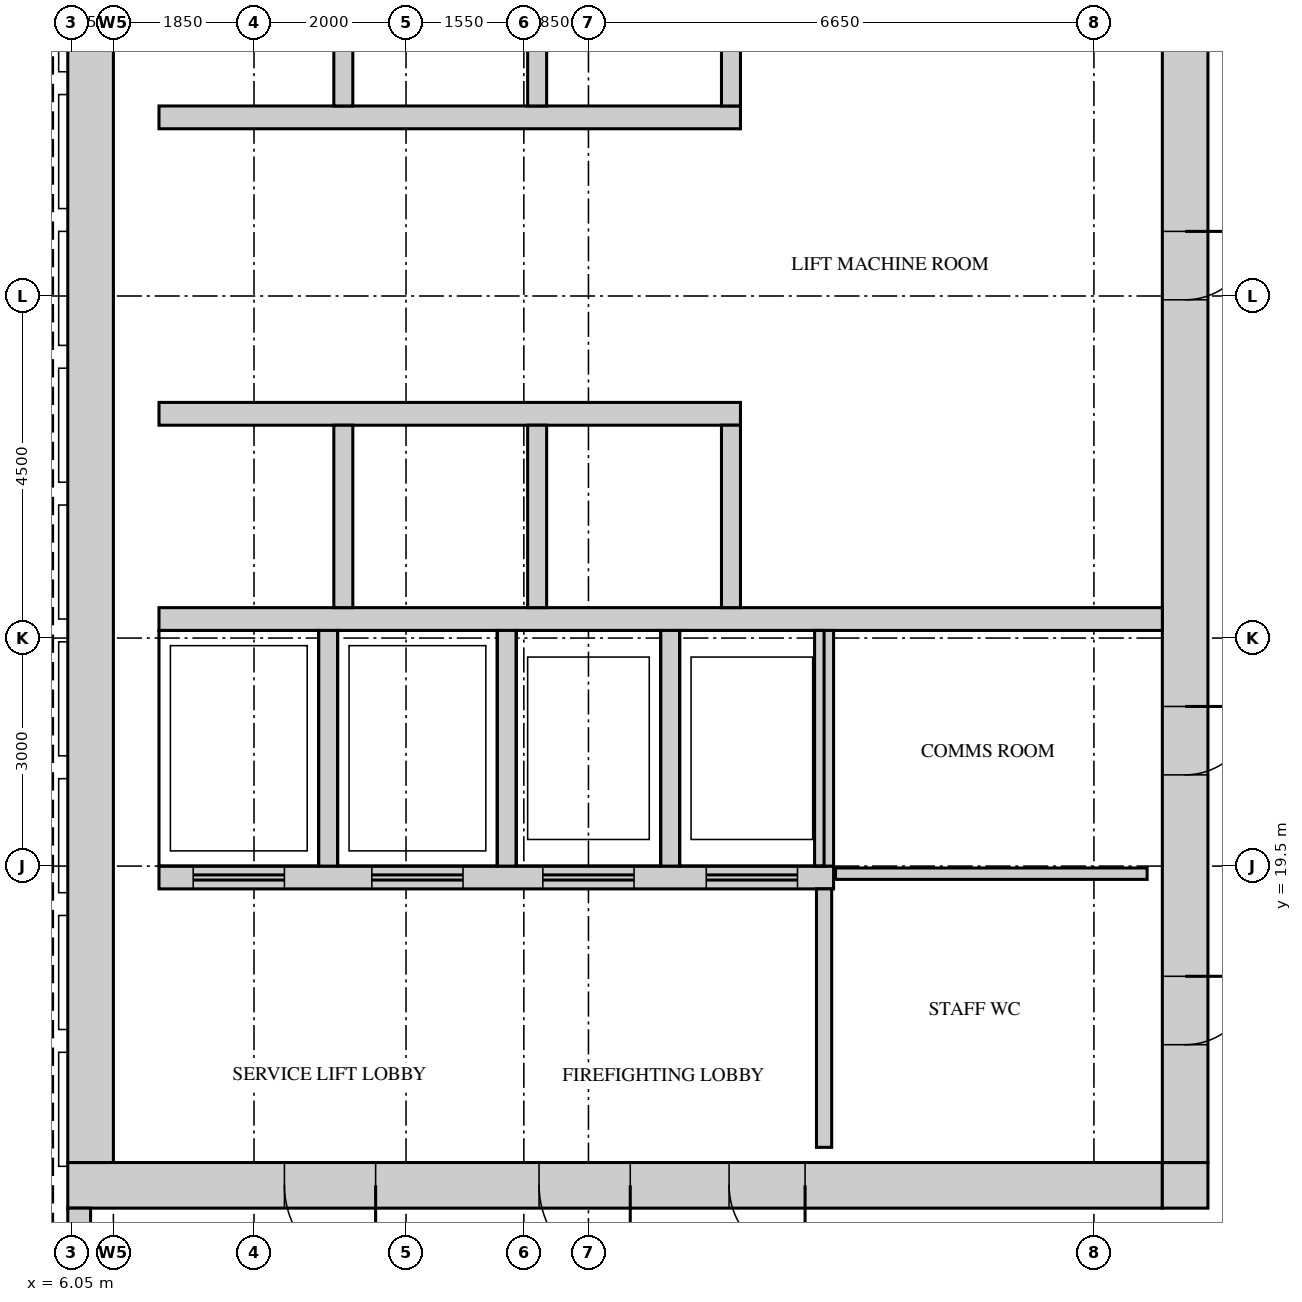
"""IFC4 building model, lengths in metres.
Left out: names, types, materials, properties, quantities, classifications, styles, units other than length and angle.
Written with IfcOpenShell. Run it as: python <this file> out.ifc"""

import sys

from ifc_helpers import new_model, si_unit, direction, frame, frame_2d, origin, place, context, subcontext, project, spatial, rectangle, extrude, source, transform, mapped, element, fill, save


model = new_model("IFC4")
c1 = context("Model", 3, precision=1e-05, world=origin(), true_north=direction((0.0, 1.0)))
c2 = subcontext(c1, "Body", "Model", "MODEL_VIEW")
j1 = project(units=[si_unit("LENGTHUNIT", "METRE"), si_unit("PLANEANGLEUNIT", "RADIAN")], contexts=[c1])
p1 = place(None, origin())
s1 = spatial("IfcSite", under=j1, at=p1, CompositionType="ELEMENT")
p2 = place(p1, origin())
s2 = spatial("IfcBuilding", under=s1, at=p2, CompositionType="ELEMENT")
p3 = place(p2, frame((0.0, 0.0, 330.2)))
s3 = spatial("IfcBuildingStorey", under=s2, at=p3, CompositionType="ELEMENT", Elevation=330.2)
m1 = source(origin(), c2, "Body", "SweptSolid", [
    extrude(rectangle(XDim=14.4, YDim=0.6, at=frame_2d((7.2, 0.0))), origin(), (0.0, 0.0, 1.0), 4.25),
])
p4 = place(p3, frame((6.0, 15.3, 0.0), z_axis=(0.0, 0.0, 1.0), x_axis=(1.0, 0.0, 0.0)))
e1 = element("IfcWall", 1, at=p4, inside=s3, PredefinedType="SHEAR", context=c2, shape_type="MappedRepresentation", body=[
    mapped(m1, transform((0.0, 0.0, 0.0))),
])
m2 = source(origin(), c2, "Body", "SweptSolid", [
    extrude(rectangle(XDim=1.2, YDim=2.1, at=frame_2d((0.6, 1.05))), frame((0.0, 0.31, 0.0), z_axis=(0.0, -1.0, 0.0), x_axis=(1.0, 0.0, 0.0)), (0.0, 0.0, 1.0), 0.62),
])
p5 = place(p4, frame((6.2, 0.0, 0.0)))
e2 = element("IfcOpeningElement", 2, at=p5, cuts=e1, PredefinedType="OPENING", context=c2, shape_type="MappedRepresentation", body=[
    mapped(m2, transform((0.0, 0.0, 0.0))),
])
p6 = place(p4, frame((2.85, 0.0, 0.0)))
e3 = element("IfcOpeningElement", 3, at=p6, cuts=e1, PredefinedType="OPENING", context=c2, shape_type="MappedRepresentation", body=[
    mapped(m2, transform((0.0, 0.0, 0.0))),
])
m3 = source(origin(), c2, "Body", "SweptSolid", [
    extrude(rectangle(XDim=1.0, YDim=2.1, at=frame_2d((0.5, 1.05))), frame((0.0, 0.31, 0.0), z_axis=(0.0, -1.0, 0.0), x_axis=(1.0, 0.0, 0.0)), (0.0, 0.0, 1.0), 0.62),
])
p7 = place(p4, frame((8.7, 0.0, 0.0)))
e4 = element("IfcOpeningElement", 4, at=p7, cuts=e1, PredefinedType="OPENING", context=c2, shape_type="MappedRepresentation", body=[
    mapped(m3, transform((0.0, 0.0, 0.0))),
])
m4 = source(origin(), c2, "Body", "SweptSolid", [
    extrude(rectangle(XDim=0.6, YDim=0.6, at=frame_2d((0.3, 0.0))), origin(), (0.0, 0.0, 1.0), 4.25),
])
p8 = place(p3, frame((20.4, 15.3, 0.0), z_axis=(0.0, 0.0, 1.0), x_axis=(1.0, 0.0, 0.0)))
e5 = element("IfcWall", 5, at=p8, inside=s3, PredefinedType="SHEAR", context=c2, shape_type="MappedRepresentation", body=[
    mapped(m4, transform((0.0, 0.0, 0.0))),
])
m5 = source(origin(), c2, "Body", "SweptSolid", [
    extrude(rectangle(XDim=22.8, YDim=0.6, at=frame_2d((11.4, 0.0))), origin(), (0.0, 0.0, 1.0), 4.25),
])
p9 = place(p3, frame((20.7, 15.6, 0.0), z_axis=(0.0, 0.0, 1.0), x_axis=(0.0, 1.0, 0.0)))
e6 = element("IfcWall", 6, at=p9, inside=s3, PredefinedType="SHEAR", context=c2, shape_type="MappedRepresentation", body=[
    mapped(m5, transform((0.0, 0.0, 0.0))),
])
m6 = source(origin(), c2, "Body", "SweptSolid", [
    extrude(rectangle(XDim=0.9, YDim=2.1, at=frame_2d((0.45, 1.05))), frame((0.0, 0.31, 0.0), z_axis=(0.0, -1.0, 0.0), x_axis=(1.0, 0.0, 0.0)), (0.0, 0.0, 1.0), 0.62),
])
p10 = place(p9, frame((11.35, 0.0, 0.0)))
e7 = element("IfcOpeningElement", 7, at=p10, cuts=e6, PredefinedType="OPENING", context=c2, shape_type="MappedRepresentation", body=[
    mapped(m6, transform((0.0, 0.0, 0.0))),
])
p11 = place(p9, frame((1.55, 0.0, 0.0)))
e8 = element("IfcOpeningElement", 8, at=p11, cuts=e6, PredefinedType="OPENING", context=c2, shape_type="MappedRepresentation", body=[
    mapped(m6, transform((0.0, 0.0, 0.0))),
])
p12 = place(p9, frame((5.1, 0.0, 0.0)))
e9 = element("IfcOpeningElement", 9, at=p12, cuts=e6, PredefinedType="OPENING", context=c2, shape_type="MappedRepresentation", body=[
    mapped(m6, transform((0.0, 0.0, 0.0))),
])
p13 = place(p3, frame((6.3, 15.6, 0.0), z_axis=(0.0, 0.0, 1.0), x_axis=(0.0, 1.0, 0.0)))
e10 = element("IfcWall", 10, at=p13, inside=s3, PredefinedType="SHEAR", context=c2, shape_type="MappedRepresentation", body=[
    mapped(m5, transform((0.0, 0.0, 0.0))),
])
m7 = source(origin(), c2, "Body", "SweptSolid", [
    extrude(rectangle(XDim=13.2, YDim=0.3, at=frame_2d((6.6, 0.0))), origin(), (0.0, 0.0, 1.0), 4.25),
])
p14 = place(p3, frame((7.2, 22.75, 0.0), z_axis=(0.0, 0.0, 1.0), x_axis=(1.0, 0.0, 0.0)))
e11 = element("IfcWall", 11, at=p14, inside=s3, PredefinedType="STANDARD", context=c2, shape_type="MappedRepresentation", body=[
    mapped(m7, transform((0.0, 0.0, 0.0))),
])
m8 = source(origin(), c2, "Body", "SweptSolid", [
    extrude(rectangle(XDim=8.875, YDim=0.3, at=frame_2d((4.438, 0.0))), origin(), (0.0, 0.0, 1.0), 4.25),
])
p15 = place(p3, frame((7.2, 19.35, 0.0), z_axis=(0.0, 0.0, 1.0), x_axis=(1.0, 0.0, 0.0)))
e12 = element("IfcWall", 12, at=p15, inside=s3, PredefinedType="STANDARD", context=c2, shape_type="MappedRepresentation", body=[
    mapped(m8, transform((0.0, 0.0, 0.0))),
])
m9 = source(origin(), c2, "Body", "SweptSolid", [
    extrude(rectangle(XDim=1.2, YDim=2.1, at=frame_2d((0.6, 1.05))), frame((0.0, 0.16, 0.0), z_axis=(0.0, -1.0, 0.0), x_axis=(1.0, 0.0, 0.0)), (0.0, 0.0, 1.0), 0.32),
])
p16 = place(p15, frame((0.45, 0.0, 0.0)))
e13 = element("IfcOpeningElement", 13, at=p16, cuts=e12, PredefinedType="OPENING", context=c2, shape_type="MappedRepresentation", body=[
    mapped(m9, transform((0.0, 0.0, 0.0))),
])
p17 = place(p15, frame((2.8, 0.0, 0.0)))
e14 = element("IfcOpeningElement", 14, at=p17, cuts=e12, PredefinedType="OPENING", context=c2, shape_type="MappedRepresentation", body=[
    mapped(m9, transform((0.0, 0.0, 0.0))),
])
p18 = place(p15, frame((5.05, 0.0, 0.0)))
e15 = element("IfcOpeningElement", 15, at=p18, cuts=e12, PredefinedType="OPENING", context=c2, shape_type="MappedRepresentation", body=[
    mapped(m9, transform((0.0, 0.0, 0.0))),
])
p19 = place(p15, frame((7.2, 0.0, 0.0)))
e16 = element("IfcOpeningElement", 16, at=p19, cuts=e12, PredefinedType="OPENING", context=c2, shape_type="MappedRepresentation", body=[
    mapped(m9, transform((0.0, 0.0, 0.0))),
])
m10 = source(origin(), c2, "Body", "SweptSolid", [
    extrude(rectangle(XDim=7.65, YDim=0.3, at=frame_2d((3.825, 0.0))), origin(), (0.0, 0.0, 1.0), 4.25),
])
for number, where, z_axis, x_axis in (
    (17, (7.2, 29.35, 0.0), (0.0, 0.0, 1.0), (1.0, 0.0, 0.0)),
    (18, (7.2, 25.45, 0.0), (0.0, 0.0, 1.0), (1.0, 0.0, 0.0)),
):
    element("IfcWall", number, at=place(p3, frame(where, z_axis=z_axis, x_axis=x_axis)), inside=s3, PredefinedType="STANDARD", context=c2, shape_type="MappedRepresentation", body=[
        mapped(m10, transform((0.0, 0.0, 0.0))),
    ])
m11 = source(origin(), c2, "Body", "SweptSolid", [
    extrude(rectangle(XDim=3.1, YDim=0.25, at=frame_2d((1.55, 0.0))), origin(), (0.0, 0.0, 1.0), 4.25),
])
for number, where, z_axis, x_axis in (
    (19, (9.425, 19.5, 0.0), (0.0, 0.0, 1.0), (0.0, 1.0, 0.0)),
    (20, (11.775, 19.5, 0.0), (0.0, 0.0, 1.0), (0.0, 1.0, 0.0)),
    (21, (13.925, 19.5, 0.0), (0.0, 0.0, 1.0), (0.0, 1.0, 0.0)),
    (22, (15.95, 19.5, 0.0), (0.0, 0.0, 1.0), (0.0, 1.0, 0.0)),
):
    element("IfcWall", number, at=place(p3, frame(where, z_axis=z_axis, x_axis=x_axis)), inside=s3, PredefinedType="STANDARD", context=c2, shape_type="MappedRepresentation", body=[
        mapped(m11, transform((0.0, 0.0, 0.0))),
    ])
m12 = source(origin(), c2, "Body", "SweptSolid", [
    extrude(rectangle(XDim=2.4, YDim=0.25, at=frame_2d((1.2, 0.0))), origin(), (0.0, 0.0, 1.0), 4.25),
])
for number, where, z_axis, x_axis in (
    (23, (9.625, 29.5, 0.0), (0.0, 0.0, 1.0), (0.0, 1.0, 0.0)),
    (24, (12.175, 29.5, 0.0), (0.0, 0.0, 1.0), (0.0, 1.0, 0.0)),
    (25, (14.725, 29.5, 0.0), (0.0, 0.0, 1.0), (0.0, 1.0, 0.0)),
):
    element("IfcWall", number, at=place(p3, frame(where, z_axis=z_axis, x_axis=x_axis)), inside=s3, PredefinedType="STANDARD", context=c2, shape_type="MappedRepresentation", body=[
        mapped(m12, transform((0.0, 0.0, 0.0))),
    ])
m13 = source(origin(), c2, "Body", "SweptSolid", [
    extrude(rectangle(XDim=2.4, YDim=0.25, at=frame_2d((1.2, 0.0))), origin(), (0.0, 0.0, 1.0), 4.25),
])
for number, where, z_axis, x_axis in (
    (26, (9.625, 22.9, 0.0), (0.0, 0.0, 1.0), (0.0, 1.0, 0.0)),
    (27, (12.175, 22.9, 0.0), (0.0, 0.0, 1.0), (0.0, 1.0, 0.0)),
    (28, (14.725, 22.9, 0.0), (0.0, 0.0, 1.0), (0.0, 1.0, 0.0)),
):
    element("IfcWall", number, at=place(p3, frame(where, z_axis=z_axis, x_axis=x_axis)), inside=s3, PredefinedType="STANDARD", context=c2, shape_type="MappedRepresentation", body=[
        mapped(m13, transform((0.0, 0.0, 0.0))),
    ])
m14 = source(origin(), c2, "Body", "SweptSolid", [
    extrude(rectangle(XDim=3.0, YDim=0.3, at=frame_2d((1.5, 0.0))), origin(), (0.0, 0.0, 1.0), 4.5),
])
p20 = place(p3, frame((6.15, 15.0, 0.0), z_axis=(0.0, 0.0, 1.0), x_axis=(0.0, -1.0, 0.0)))
e29 = element("IfcWall", 29, at=p20, inside=s3, PredefinedType="SOLIDWALL", context=c2, shape_type="MappedRepresentation", body=[
    mapped(m14, transform((0.0, 0.0, 0.0))),
])
m15 = source(origin(), c2, "Body", "SweptSolid", [
    extrude(rectangle(XDim=1.2, YDim=2.4, at=frame_2d((0.6, 1.2))), frame((0.0, 0.16, 0.0), z_axis=(0.0, -1.0, 0.0), x_axis=(1.0, 0.0, 0.0)), (0.0, 0.0, 1.0), 0.32),
])
p21 = place(p20, frame((0.9, 0.0, 0.9)))
e30 = element("IfcOpeningElement", 30, at=p21, cuts=e29, PredefinedType="OPENING", context=c2, shape_type="MappedRepresentation", body=[
    mapped(m15, transform((0.0, 0.0, 0.0))),
])
m16 = source(origin(), c2, "Body", "SweptSolid", [
    extrude(rectangle(XDim=3.4, YDim=0.2, at=frame_2d((1.7, 0.0))), origin(), (0.0, 0.0, 1.0), 4.3),
])
p22 = place(p3, frame((15.95, 15.8, 0.0), z_axis=(0.0, 0.0, 1.0), x_axis=(0.0, 1.0, 0.0)))
e31 = element("IfcWall", 31, at=p22, inside=s3, PredefinedType="PARTITIONING", context=c2, shape_type="MappedRepresentation", body=[
    mapped(m16, transform((0.0, 0.0, 0.0))),
])
m17 = source(origin(), c2, "Body", "SweptSolid", [
    extrude(rectangle(XDim=4.1, YDim=0.15, at=frame_2d((2.05, 0.0))), origin(), (0.0, 0.0, 1.0), 4.3),
])
p23 = place(p3, frame((16.1, 19.4, 0.0), z_axis=(0.0, 0.0, 1.0), x_axis=(1.0, 0.0, 0.0)))
e32 = element("IfcWall", 32, at=p23, inside=s3, PredefinedType="PARTITIONING", context=c2, shape_type="MappedRepresentation", body=[
    mapped(m17, transform((0.0, 0.0, 0.0))),
])
m18 = source(origin(), c2, "Body", "SweptSolid", [
    extrude(rectangle(XDim=0.9, YDim=2.1, at=frame_2d((0.45, 1.05))), frame((0.0, 0.25, 0.0), z_axis=(0.0, -1.0, 0.0), x_axis=(1.0, 0.0, 0.0)), (0.0, 0.0, 1.0), 0.5),
])
p24 = place(p10, origin())
e33 = element("IfcDoor", 33, at=p24, inside=s3, OperationType="SINGLE_SWING_RIGHT", PredefinedType="DOOR", context=c2, shape_type="MappedRepresentation", body=[
    mapped(m18, transform((0.0, 0.0, 0.0))),
])
fill(e7, e33)
p25 = place(p11, origin())
e34 = element("IfcDoor", 34, at=p25, inside=s3, OperationType="SINGLE_SWING_RIGHT", PredefinedType="DOOR", context=c2, shape_type="MappedRepresentation", body=[
    mapped(m18, transform((0.0, 0.0, 0.0))),
])
fill(e8, e34)
p26 = place(p12, origin())
e35 = element("IfcDoor", 35, at=p26, inside=s3, OperationType="SINGLE_SWING_RIGHT", PredefinedType="DOOR", context=c2, shape_type="MappedRepresentation", body=[
    mapped(m18, transform((0.0, 0.0, 0.0))),
])
fill(e9, e35)
m19 = source(origin(), c2, "Body", "SweptSolid", [
    extrude(rectangle(XDim=1.2, YDim=2.1, at=frame_2d((0.6, 1.05))), frame((0.0, 0.25, 0.0), z_axis=(0.0, -1.0, 0.0), x_axis=(1.0, 0.0, 0.0)), (0.0, 0.0, 1.0), 0.5),
])
p27 = place(p5, origin())
e36 = element("IfcDoor", 36, at=p27, inside=s3, OperationType="SINGLE_SWING_RIGHT", PredefinedType="DOOR", context=c2, shape_type="MappedRepresentation", body=[
    mapped(m19, transform((0.0, 0.0, 0.0))),
])
fill(e2, e36)
p28 = place(p6, origin())
e37 = element("IfcDoor", 37, at=p28, inside=s3, OperationType="SINGLE_SWING_RIGHT", PredefinedType="DOOR", context=c2, shape_type="MappedRepresentation", body=[
    mapped(m19, transform((0.0, 0.0, 0.0))),
])
fill(e3, e37)
m20 = source(origin(), c2, "Body", "SweptSolid", [
    extrude(rectangle(XDim=1.0, YDim=2.1, at=frame_2d((0.5, 1.05))), frame((0.0, 0.25, 0.0), z_axis=(0.0, -1.0, 0.0), x_axis=(1.0, 0.0, 0.0)), (0.0, 0.0, 1.0), 0.5),
])
p29 = place(p7, origin())
e38 = element("IfcDoor", 38, at=p29, inside=s3, OperationType="SINGLE_SWING_RIGHT", PredefinedType="DOOR", context=c2, shape_type="MappedRepresentation", body=[
    mapped(m20, transform((0.0, 0.0, 0.0))),
])
fill(e4, e38)
m21 = source(origin(), c2, "Body", "SweptSolid", [
    extrude(rectangle(XDim=1.2, YDim=2.1, at=frame_2d((0.6, 1.05))), frame((0.0, 0.025, 0.0), z_axis=(0.0, -1.0, 0.0), x_axis=(1.0, 0.0, 0.0)), (0.0, 0.0, 1.0), 0.05),
])
p30 = place(p16, origin())
e39 = element("IfcDoor", 39, at=p30, inside=s3, OperationType="DOUBLE_DOOR_SLIDING", PredefinedType="DOOR", context=c2, shape_type="MappedRepresentation", body=[
    mapped(m21, transform((0.0, 0.0, 0.0))),
])
fill(e13, e39)
p31 = place(p17, origin())
e40 = element("IfcDoor", 40, at=p31, inside=s3, OperationType="DOUBLE_DOOR_SLIDING", PredefinedType="DOOR", context=c2, shape_type="MappedRepresentation", body=[
    mapped(m21, transform((0.0, 0.0, 0.0))),
])
fill(e14, e40)
p32 = place(p18, origin())
e41 = element("IfcDoor", 41, at=p32, inside=s3, OperationType="DOUBLE_DOOR_SLIDING", PredefinedType="DOOR", context=c2, shape_type="MappedRepresentation", body=[
    mapped(m21, transform((0.0, 0.0, 0.0))),
])
fill(e15, e41)
p33 = place(p19, origin())
e42 = element("IfcDoor", 42, at=p33, inside=s3, OperationType="DOUBLE_DOOR_SLIDING", PredefinedType="DOOR", context=c2, shape_type="MappedRepresentation", body=[
    mapped(m21, transform((0.0, 0.0, 0.0))),
])
fill(e16, e42)
save(model, sys.argv[1])
